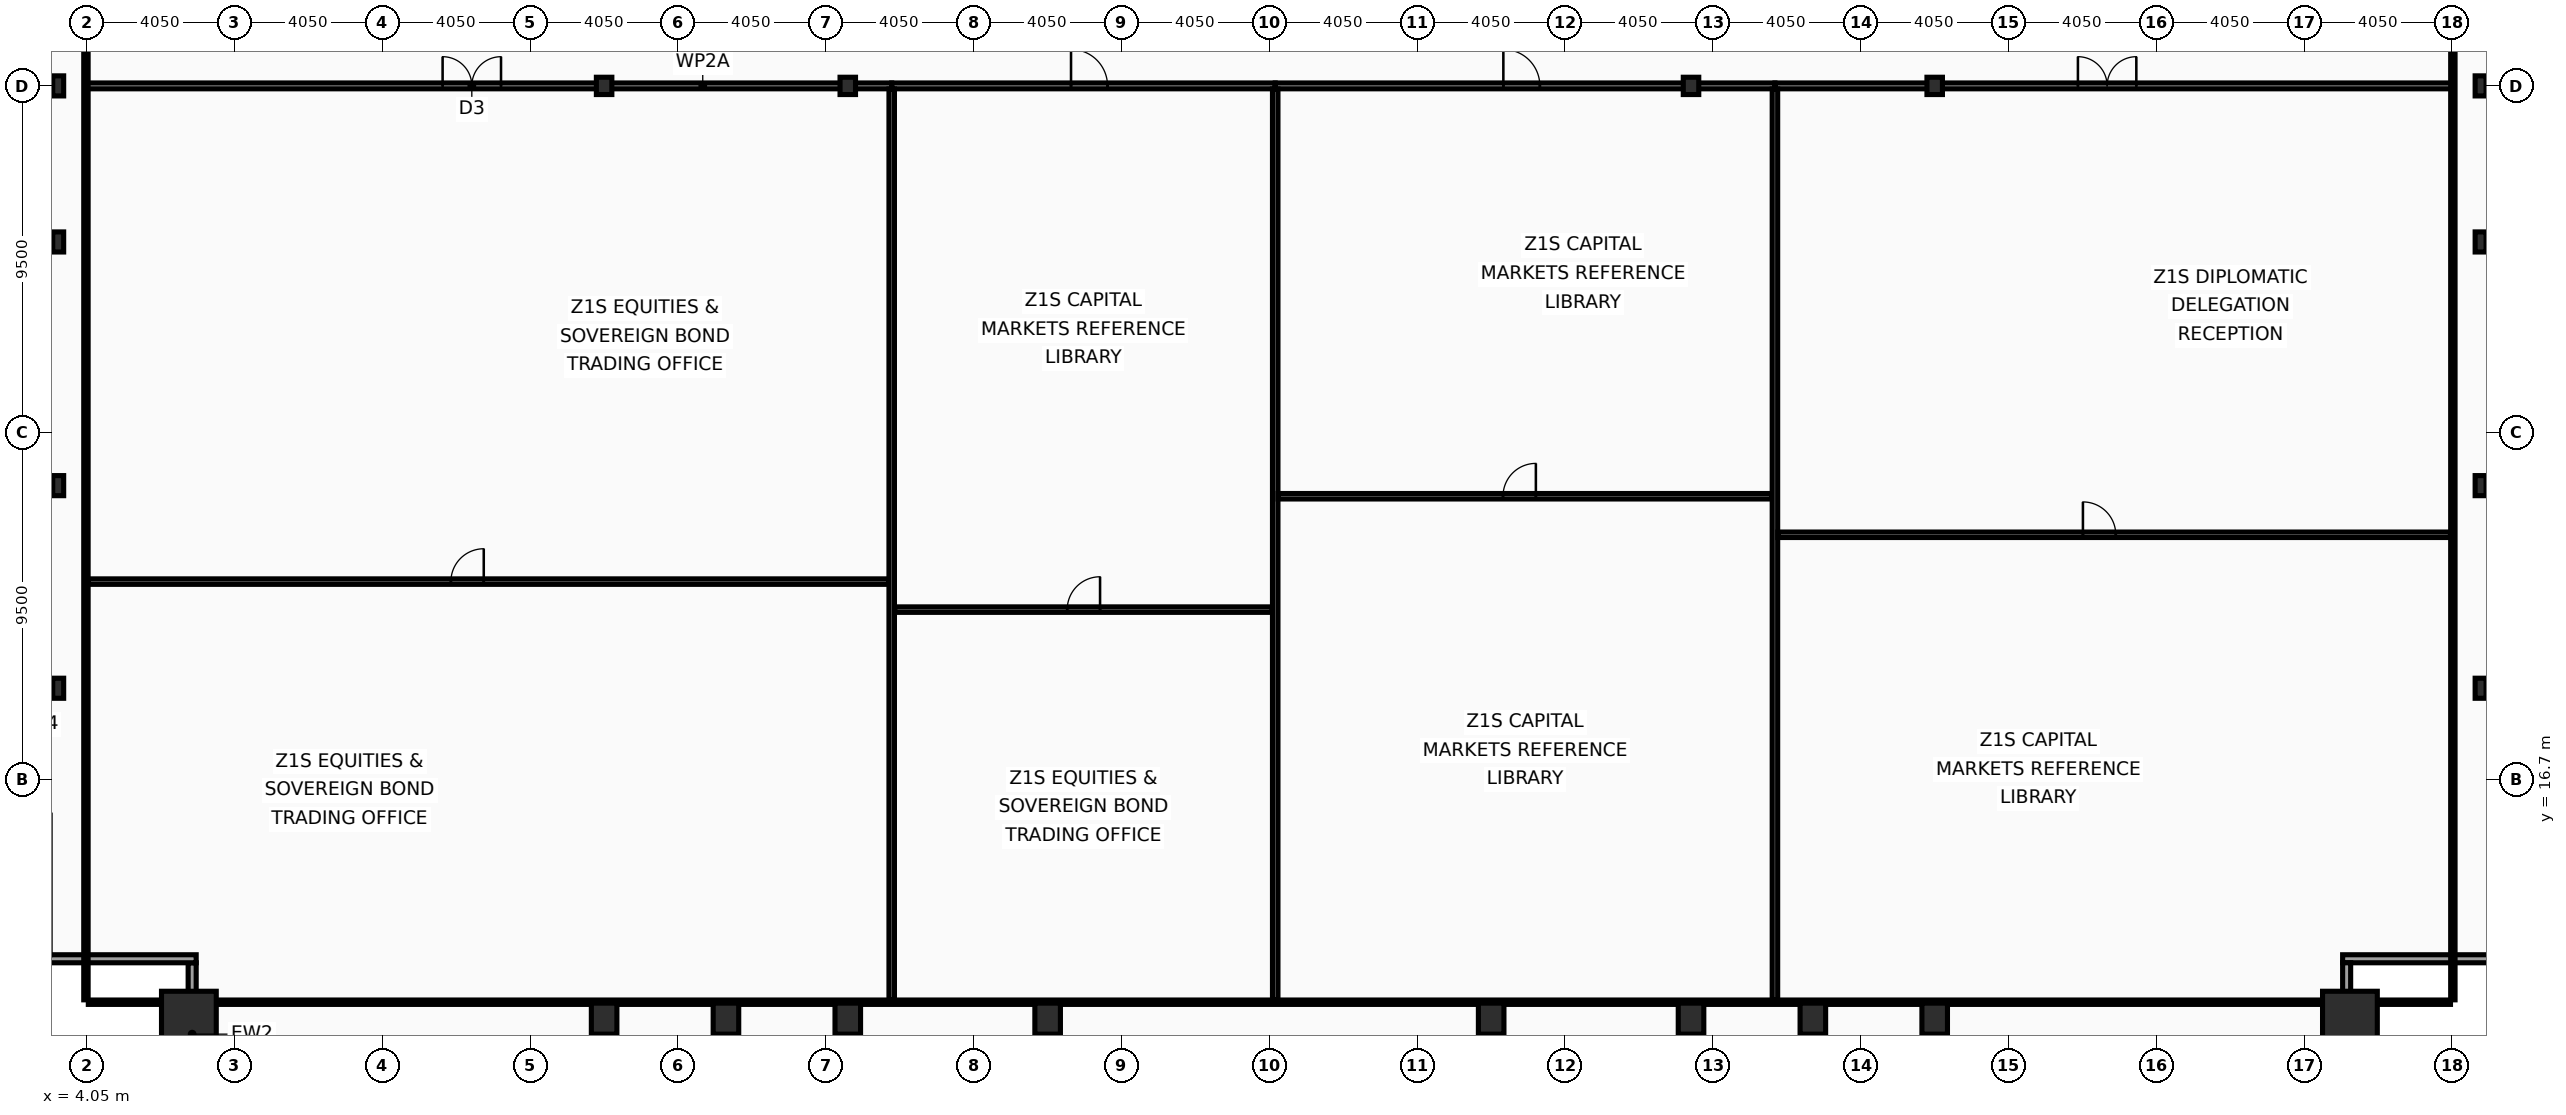
"""IFC4 building model, lengths in metres.
Left out: names, types, materials, properties, quantities, classifications, styles, units other than length and angle.
Written with IfcOpenShell. Run it as: python <this file> out.ifc"""

import sys

from ifc_helpers import new_model, si_unit, direction, frame, frame_2d, origin, origin_2d, place, context, subcontext, project, spatial, rectangle, hollow_rectangle, i_section, extrude, element, fill, save


model = new_model("IFC4")
c1 = context("Model", 3, precision=1e-05, world=origin(), true_north=direction((0.0, 1.0)))
c2 = subcontext(c1, "Body", "Model", "MODEL_VIEW")
j1 = project(units=[si_unit("LENGTHUNIT", "METRE"), si_unit("PLANEANGLEUNIT", "RADIAN")], contexts=[c1])
p1 = place(None, origin())
s1 = spatial("IfcSite", under=j1, at=p1, CompositionType="ELEMENT")
p2 = place(p1, origin())
s2 = spatial("IfcBuilding", under=s1, at=p2, CompositionType="ELEMENT")
p3 = place(p2, frame((0.0, 0.0, 94.6)))
s3 = spatial("IfcBuildingStorey", under=s2, at=p3, CompositionType="ELEMENT", Elevation=94.6)
for number, where, z_axis, x_axis in (
    (1, (6.85, 10.15, 0.0), (0.0, 0.0, 1.0), (1.0, 0.0, 0.0)),
    (2, (66.05, 10.15, 0.0), (0.0, 0.0, 1.0), (1.0, 0.0, 0.0)),
):
    element("IfcColumn", number, at=place(p3, frame(where, z_axis=z_axis, x_axis=x_axis)), inside=s3, PredefinedType="COLUMN", context=c2, shape_type="SweptSolid", body=[
        extrude(hollow_rectangle(XDim=1.5, YDim=1.5, WallThickness=0.07, at=origin_2d()), origin(), (0.0, 0.0, 1.0), 4.0),
    ])
for number, where, z_axis, x_axis in (
    (3, (18.225, 10.15, 0.0), (0.0, 0.0, 1.0), (1.0, 0.0, 0.0)),
    (4, (21.562, 10.15, 0.0), (0.0, 0.0, 1.0), (1.0, 0.0, 0.0)),
    (5, (24.9, 10.15, 0.0), (0.0, 0.0, 1.0), (1.0, 0.0, 0.0)),
    (6, (30.375, 10.15, 0.0), (0.0, 0.0, 1.0), (1.0, 0.0, 0.0)),
    (7, (42.525, 10.15, 0.0), (0.0, 0.0, 1.0), (1.0, 0.0, 0.0)),
    (8, (48.0, 10.15, 0.0), (0.0, 0.0, 1.0), (1.0, 0.0, 0.0)),
    (9, (51.337, 10.15, 0.0), (0.0, 0.0, 1.0), (1.0, 0.0, 0.0)),
    (10, (54.675, 10.15, 0.0), (0.0, 0.0, 1.0), (1.0, 0.0, 0.0)),
):
    element("IfcColumn", number, at=place(p3, frame(where, z_axis=z_axis, x_axis=x_axis)), inside=s3, PredefinedType="COLUMN", context=c2, shape_type="SweptSolid", body=[
        extrude(hollow_rectangle(XDim=0.7, YDim=0.85, WallThickness=0.05, at=origin_2d()), origin(), (0.0, 0.0, 1.0), 4.0),
    ])
for number, where, z_axis, x_axis in (
    (11, (3.27, 19.2, 0.0), (0.0, 0.0, 1.0), (1.0, 0.0, 0.0)),
    (12, (3.27, 24.75, 0.0), (0.0, 0.0, 1.0), (1.0, 0.0, 0.0)),
    (13, (3.27, 31.425, 0.0), (0.0, 0.0, 1.0), (1.0, 0.0, 0.0)),
    (14, (3.27, 35.7, 0.0), (0.0, 0.0, 1.0), (1.0, 0.0, 0.0)),
    (15, (69.63, 19.2, 0.0), (0.0, 0.0, 1.0), (1.0, 0.0, 0.0)),
    (16, (69.63, 24.75, 0.0), (0.0, 0.0, 1.0), (1.0, 0.0, 0.0)),
    (17, (69.63, 31.425, 0.0), (0.0, 0.0, 1.0), (1.0, 0.0, 0.0)),
    (18, (69.63, 35.7, 0.0), (0.0, 0.0, 1.0), (1.0, 0.0, 0.0)),
):
    element("IfcColumn", number, at=place(p3, frame(where, z_axis=z_axis, x_axis=x_axis)), inside=s3, PredefinedType="COLUMN", context=c2, shape_type="SweptSolid", body=[
        extrude(i_section(OverallWidth=0.3, OverallDepth=0.55, WebThickness=0.015, FlangeThickness=0.029, at=origin_2d()), origin(), (0.0, 0.0, 1.0), 4.0),
    ])
for number, where, z_axis, x_axis in (
    (19, (18.225, 35.7, 0.0), (0.0, 0.0, 1.0), (1.0, 0.0, 0.0)),
    (20, (24.9, 35.7, 0.0), (0.0, 0.0, 1.0), (1.0, 0.0, 0.0)),
    (21, (48.0, 35.7, 0.0), (0.0, 0.0, 1.0), (1.0, 0.0, 0.0)),
    (22, (54.675, 35.7, 0.0), (0.0, 0.0, 1.0), (1.0, 0.0, 0.0)),
):
    element("IfcColumn", number, at=place(p3, frame(where, z_axis=z_axis, x_axis=x_axis)), inside=s3, PredefinedType="COLUMN", context=c2, shape_type="SweptSolid", body=[
        extrude(i_section(OverallWidth=0.424, OverallDepth=0.474, WebThickness=0.048, FlangeThickness=0.077, at=origin_2d()), origin(), (0.0, 0.0, 1.0), 4.0),
    ])
p4 = place(p3, frame((6.94, 7.77, 0.0), z_axis=(0.0, 0.0, 1.0), x_axis=(0.0, 1.0, 0.0)))
e23 = element("IfcWall", 23, at=p4, inside=s3, PredefinedType="SOLIDWALL", context=c2, shape_type="SweptSolid", body=[
    extrude(rectangle(XDim=3.91, YDim=0.22, at=frame_2d((1.955, 0.0))), origin(), (0.0, 0.0, 1.0), 3.16),
])
for number, where, z_axis, x_axis in (
    (24, (7.05, 11.79, 0.0), (0.0, 0.0, 1.0), (-1.0, 0.0, 0.0)),
    (25, (70.07, 11.79, 0.0), (0.0, 0.0, 1.0), (-1.0, 0.0, 0.0)),
):
    element("IfcWall", number, at=place(p3, frame(where, z_axis=z_axis, x_axis=x_axis)), inside=s3, PredefinedType="SOLIDWALL", context=c2, shape_type="SweptSolid", body=[
        extrude(rectangle(XDim=4.22, YDim=0.22, at=frame_2d((2.11, 0.0))), origin(), (0.0, 0.0, 1.0), 3.16),
    ])
p5 = place(p3, frame((65.96, 11.68, 0.0), z_axis=(0.0, 0.0, 1.0), x_axis=(0.0, -1.0, 0.0)))
e26 = element("IfcWall", 26, at=p5, inside=s3, PredefinedType="SOLIDWALL", context=c2, shape_type="SweptSolid", body=[
    extrude(rectangle(XDim=3.91, YDim=0.22, at=frame_2d((1.955, 0.0))), origin(), (0.0, 0.0, 1.0), 3.16),
])
p6 = place(p3, frame((4.03, 35.7, 0.0), z_axis=(0.0, 0.0, 1.0), x_axis=(1.0, 0.0, 0.0)))
e27 = element("IfcWall", 27, at=p6, inside=s3, PredefinedType="PARTITIONING", context=c2, shape_type="SweptSolid", body=[
    extrude(rectangle(XDim=22.073, YDim=0.16, at=frame_2d((11.037, 0.0))), origin(), (0.0, 0.0, 1.0), 3.01),
])
p7 = place(p6, frame((9.771, 0.0, 0.0)))
e28 = element("IfcOpeningElement", 28, at=p7, cuts=e27, PredefinedType="OPENING", context=c2, shape_type="SweptSolid", body=[
    extrude(rectangle(XDim=1.6, YDim=2.15, at=frame_2d((0.8, 1.075))), frame((0.0, 0.09, 0.0), z_axis=(0.0, -1.0, 0.0), x_axis=(1.0, 0.0, 0.0)), (0.0, 0.0, 1.0), 0.18),
])
p8 = place(p3, frame((4.095, 22.121, 0.0), z_axis=(0.0, 0.0, 1.0), x_axis=(1.0, 0.0, 0.0)))
e29 = element("IfcWall", 29, at=p8, inside=s3, PredefinedType="PARTITIONING", context=c2, shape_type="SweptSolid", body=[
    extrude(rectangle(XDim=21.928, YDim=0.15, at=frame_2d((10.964, 0.0))), origin(), (0.0, 0.0, 1.0), 3.01),
])
p9 = place(p8, frame((9.933, 0.0, 0.0)))
e30 = element("IfcOpeningElement", 30, at=p9, cuts=e29, PredefinedType="OPENING", context=c2, shape_type="SweptSolid", body=[
    extrude(rectangle(XDim=0.9, YDim=2.05, at=frame_2d((0.45, 1.025))), frame((0.0, 0.085, 0.0), z_axis=(0.0, -1.0, 0.0), x_axis=(1.0, 0.0, 0.0)), (0.0, 0.0, 1.0), 0.17),
])
p10 = place(p3, frame((26.103, 35.7, 0.0), z_axis=(0.0, 0.0, 1.0), x_axis=(1.0, 0.0, 0.0)))
e31 = element("IfcWall", 31, at=p10, inside=s3, PredefinedType="PARTITIONING", context=c2, shape_type="SweptSolid", body=[
    extrude(rectangle(XDim=10.506, YDim=0.16, at=frame_2d((5.253, 0.0))), origin(), (0.0, 0.0, 1.0), 3.01),
])
p11 = place(p10, frame((4.913, 0.0, 0.0)))
e32 = element("IfcOpeningElement", 32, at=p11, cuts=e31, PredefinedType="OPENING", context=c2, shape_type="SweptSolid", body=[
    extrude(rectangle(XDim=1.0, YDim=2.05, at=frame_2d((0.5, 1.025))), frame((0.0, 0.09, 0.0), z_axis=(0.0, -1.0, 0.0), x_axis=(1.0, 0.0, 0.0)), (0.0, 0.0, 1.0), 0.18),
])
p12 = place(p3, frame((26.103, 10.665, 0.0), z_axis=(0.0, 0.0, 1.0), x_axis=(0.0, 1.0, 0.0)))
e33 = element("IfcWall", 33, at=p12, inside=s3, PredefinedType="PARTITIONING", context=c2, shape_type="SweptSolid", body=[
    extrude(rectangle(XDim=24.95, YDim=0.15, at=frame_2d((12.475, 0.0))), origin(), (0.0, 0.0, 1.0), 3.26),
])
p13 = place(p3, frame((26.183, 21.354, 0.0), z_axis=(0.0, 0.0, 1.0), x_axis=(1.0, 0.0, 0.0)))
e34 = element("IfcWall", 34, at=p13, inside=s3, PredefinedType="PARTITIONING", context=c2, shape_type="SweptSolid", body=[
    extrude(rectangle(XDim=10.346, YDim=0.15, at=frame_2d((5.173, 0.0))), origin(), (0.0, 0.0, 1.0), 3.01),
])
p14 = place(p13, frame((4.728, 0.0, 0.0)))
e35 = element("IfcOpeningElement", 35, at=p14, cuts=e34, PredefinedType="OPENING", context=c2, shape_type="SweptSolid", body=[
    extrude(rectangle(XDim=0.9, YDim=2.05, at=frame_2d((0.45, 1.025))), frame((0.0, 0.085, 0.0), z_axis=(0.0, -1.0, 0.0), x_axis=(1.0, 0.0, 0.0)), (0.0, 0.0, 1.0), 0.17),
])
p15 = place(p3, frame((36.609, 35.7, 0.0), z_axis=(0.0, 0.0, 1.0), x_axis=(1.0, 0.0, 0.0)))
e36 = element("IfcWall", 36, at=p15, inside=s3, PredefinedType="PARTITIONING", context=c2, shape_type="SweptSolid", body=[
    extrude(rectangle(XDim=13.69, YDim=0.16, at=frame_2d((6.845, 0.0))), origin(), (0.0, 0.0, 1.0), 3.01),
])
p16 = place(p15, frame((6.25, 0.0, 0.0)))
e37 = element("IfcOpeningElement", 37, at=p16, cuts=e36, PredefinedType="OPENING", context=c2, shape_type="SweptSolid", body=[
    extrude(rectangle(XDim=1.0, YDim=2.05, at=frame_2d((0.5, 1.025))), frame((0.0, 0.09, 0.0), z_axis=(0.0, -1.0, 0.0), x_axis=(1.0, 0.0, 0.0)), (0.0, 0.0, 1.0), 0.18),
])
p17 = place(p3, frame((36.609, 10.665, 0.0), z_axis=(0.0, 0.0, 1.0), x_axis=(0.0, 1.0, 0.0)))
e38 = element("IfcWall", 38, at=p17, inside=s3, PredefinedType="PARTITIONING", context=c2, shape_type="SweptSolid", body=[
    extrude(rectangle(XDim=24.95, YDim=0.15, at=frame_2d((12.475, 0.0))), origin(), (0.0, 0.0, 1.0), 3.26),
])
p18 = place(p3, frame((36.689, 24.459, 0.0), z_axis=(0.0, 0.0, 1.0), x_axis=(1.0, 0.0, 0.0)))
e39 = element("IfcWall", 39, at=p18, inside=s3, PredefinedType="PARTITIONING", context=c2, shape_type="SweptSolid", body=[
    extrude(rectangle(XDim=13.53, YDim=0.15, at=frame_2d((6.765, 0.0))), origin(), (0.0, 0.0, 1.0), 3.01),
])
p19 = place(p18, frame((6.16, 0.0, 0.0)))
e40 = element("IfcOpeningElement", 40, at=p19, cuts=e39, PredefinedType="OPENING", context=c2, shape_type="SweptSolid", body=[
    extrude(rectangle(XDim=0.9, YDim=2.05, at=frame_2d((0.45, 1.025))), frame((0.0, 0.085, 0.0), z_axis=(0.0, -1.0, 0.0), x_axis=(1.0, 0.0, 0.0)), (0.0, 0.0, 1.0), 0.17),
])
p20 = place(p3, frame((50.299, 35.7, 0.0), z_axis=(0.0, 0.0, 1.0), x_axis=(1.0, 0.0, 0.0)))
e41 = element("IfcWall", 41, at=p20, inside=s3, PredefinedType="PARTITIONING", context=c2, shape_type="SweptSolid", body=[
    extrude(rectangle(XDim=18.571, YDim=0.16, at=frame_2d((9.286, 0.0))), origin(), (0.0, 0.0, 1.0), 3.01),
])
p21 = place(p20, frame((8.3, 0.0, 0.0)))
e42 = element("IfcOpeningElement", 42, at=p21, cuts=e41, PredefinedType="OPENING", context=c2, shape_type="SweptSolid", body=[
    extrude(rectangle(XDim=1.6, YDim=2.15, at=frame_2d((0.8, 1.075))), frame((0.0, 0.09, 0.0), z_axis=(0.0, -1.0, 0.0), x_axis=(1.0, 0.0, 0.0)), (0.0, 0.0, 1.0), 0.18),
])
p22 = place(p3, frame((50.299, 10.665, 0.0), z_axis=(0.0, 0.0, 1.0), x_axis=(0.0, 1.0, 0.0)))
e43 = element("IfcWall", 43, at=p22, inside=s3, PredefinedType="PARTITIONING", context=c2, shape_type="SweptSolid", body=[
    extrude(rectangle(XDim=24.95, YDim=0.15, at=frame_2d((12.475, 0.0))), origin(), (0.0, 0.0, 1.0), 3.26),
])
p23 = place(p3, frame((50.379, 23.404, 0.0), z_axis=(0.0, 0.0, 1.0), x_axis=(1.0, 0.0, 0.0)))
e44 = element("IfcWall", 44, at=p23, inside=s3, PredefinedType="PARTITIONING", context=c2, shape_type="SweptSolid", body=[
    extrude(rectangle(XDim=18.426, YDim=0.15, at=frame_2d((9.213, 0.0))), origin(), (0.0, 0.0, 1.0), 3.01),
])
p24 = place(p23, frame((8.357, 0.0, 0.0)))
e45 = element("IfcOpeningElement", 45, at=p24, cuts=e44, PredefinedType="OPENING", context=c2, shape_type="SweptSolid", body=[
    extrude(rectangle(XDim=0.9, YDim=2.05, at=frame_2d((0.45, 1.025))), frame((0.0, 0.085, 0.0), z_axis=(0.0, -1.0, 0.0), x_axis=(1.0, 0.0, 0.0)), (0.0, 0.0, 1.0), 0.17),
])
for number, where, z_axis, x_axis in (
    (46, (4.03, 10.665, 0.0), (0.0, 0.0, 1.0), (0.0, 1.0, 0.0)),
    (47, (68.87, 10.665, 0.0), (0.0, 0.0, 1.0), (0.0, 1.0, 0.0)),
):
    element("IfcWall", number, at=place(p3, frame(where, z_axis=z_axis, x_axis=x_axis)), inside=s3, PredefinedType="PARTITIONING", context=c2, shape_type="SweptSolid", body=[
        extrude(rectangle(XDim=42.11, YDim=0.12, at=frame_2d((21.055, 0.0))), origin(), (0.0, 0.0, 1.0), 3.01),
    ])
p25 = place(p3, frame((4.095, 10.6, 0.0), z_axis=(0.0, 0.0, 1.0), x_axis=(1.0, 0.0, 0.0)))
e48 = element("IfcWall", 48, at=p25, inside=s3, PredefinedType="PARTITIONING", context=c2, shape_type="SweptSolid", body=[
    extrude(rectangle(XDim=64.71, YDim=0.12, at=frame_2d((32.355, 0.0))), origin(), (0.0, 0.0, 1.0), 3.01),
])
p26 = place(p7, origin())
e49 = element("IfcDoor", 49, at=p26, inside=s3, OperationType="DOUBLE_DOOR_SINGLE_SWING", PredefinedType="DOOR", context=c2, shape_type="SweptSolid", body=[
    extrude(rectangle(XDim=1.6, YDim=2.15, at=frame_2d((0.8, 1.075))), frame((0.0, 0.025, 0.0), z_axis=(0.0, -1.0, 0.0), x_axis=(1.0, 0.0, 0.0)), (0.0, 0.0, 1.0), 0.05),
])
fill(e28, e49)
p27 = place(p9, origin())
e50 = element("IfcDoor", 50, at=p27, inside=s3, OperationType="SINGLE_SWING_RIGHT", PredefinedType="DOOR", context=c2, shape_type="SweptSolid", body=[
    extrude(rectangle(XDim=0.9, YDim=2.05, at=frame_2d((0.45, 1.025))), frame((0.0, 0.025, 0.0), z_axis=(0.0, -1.0, 0.0), x_axis=(1.0, 0.0, 0.0)), (0.0, 0.0, 1.0), 0.05),
])
fill(e30, e50)
p28 = place(p11, origin())
e51 = element("IfcDoor", 51, at=p28, inside=s3, OperationType="SINGLE_SWING_LEFT", PredefinedType="DOOR", context=c2, shape_type="SweptSolid", body=[
    extrude(rectangle(XDim=1.0, YDim=2.05, at=frame_2d((0.5, 1.025))), frame((0.0, 0.025, 0.0), z_axis=(0.0, -1.0, 0.0), x_axis=(1.0, 0.0, 0.0)), (0.0, 0.0, 1.0), 0.05),
])
fill(e32, e51)
p29 = place(p14, origin())
e52 = element("IfcDoor", 52, at=p29, inside=s3, OperationType="SINGLE_SWING_RIGHT", PredefinedType="DOOR", context=c2, shape_type="SweptSolid", body=[
    extrude(rectangle(XDim=0.9, YDim=2.05, at=frame_2d((0.45, 1.025))), frame((0.0, 0.025, 0.0), z_axis=(0.0, -1.0, 0.0), x_axis=(1.0, 0.0, 0.0)), (0.0, 0.0, 1.0), 0.05),
])
fill(e35, e52)
p30 = place(p16, origin())
e53 = element("IfcDoor", 53, at=p30, inside=s3, OperationType="SINGLE_SWING_LEFT", PredefinedType="DOOR", context=c2, shape_type="SweptSolid", body=[
    extrude(rectangle(XDim=1.0, YDim=2.05, at=frame_2d((0.5, 1.025))), frame((0.0, 0.025, 0.0), z_axis=(0.0, -1.0, 0.0), x_axis=(1.0, 0.0, 0.0)), (0.0, 0.0, 1.0), 0.05),
])
fill(e37, e53)
p31 = place(p19, origin())
e54 = element("IfcDoor", 54, at=p31, inside=s3, OperationType="SINGLE_SWING_RIGHT", PredefinedType="DOOR", context=c2, shape_type="SweptSolid", body=[
    extrude(rectangle(XDim=0.9, YDim=2.05, at=frame_2d((0.45, 1.025))), frame((0.0, 0.025, 0.0), z_axis=(0.0, -1.0, 0.0), x_axis=(1.0, 0.0, 0.0)), (0.0, 0.0, 1.0), 0.05),
])
fill(e40, e54)
p32 = place(p21, origin())
e55 = element("IfcDoor", 55, at=p32, inside=s3, OperationType="DOUBLE_DOOR_SINGLE_SWING", PredefinedType="DOOR", context=c2, shape_type="SweptSolid", body=[
    extrude(rectangle(XDim=1.6, YDim=2.15, at=frame_2d((0.8, 1.075))), frame((0.0, 0.025, 0.0), z_axis=(0.0, -1.0, 0.0), x_axis=(1.0, 0.0, 0.0)), (0.0, 0.0, 1.0), 0.05),
])
fill(e42, e55)
p33 = place(p24, origin())
e56 = element("IfcDoor", 56, at=p33, inside=s3, OperationType="SINGLE_SWING_LEFT", PredefinedType="DOOR", context=c2, shape_type="SweptSolid", body=[
    extrude(rectangle(XDim=0.9, YDim=2.05, at=frame_2d((0.45, 1.025))), frame((0.0, 0.025, 0.0), z_axis=(0.0, -1.0, 0.0), x_axis=(1.0, 0.0, 0.0)), (0.0, 0.0, 1.0), 0.05),
])
fill(e45, e56)
save(model, sys.argv[1])
